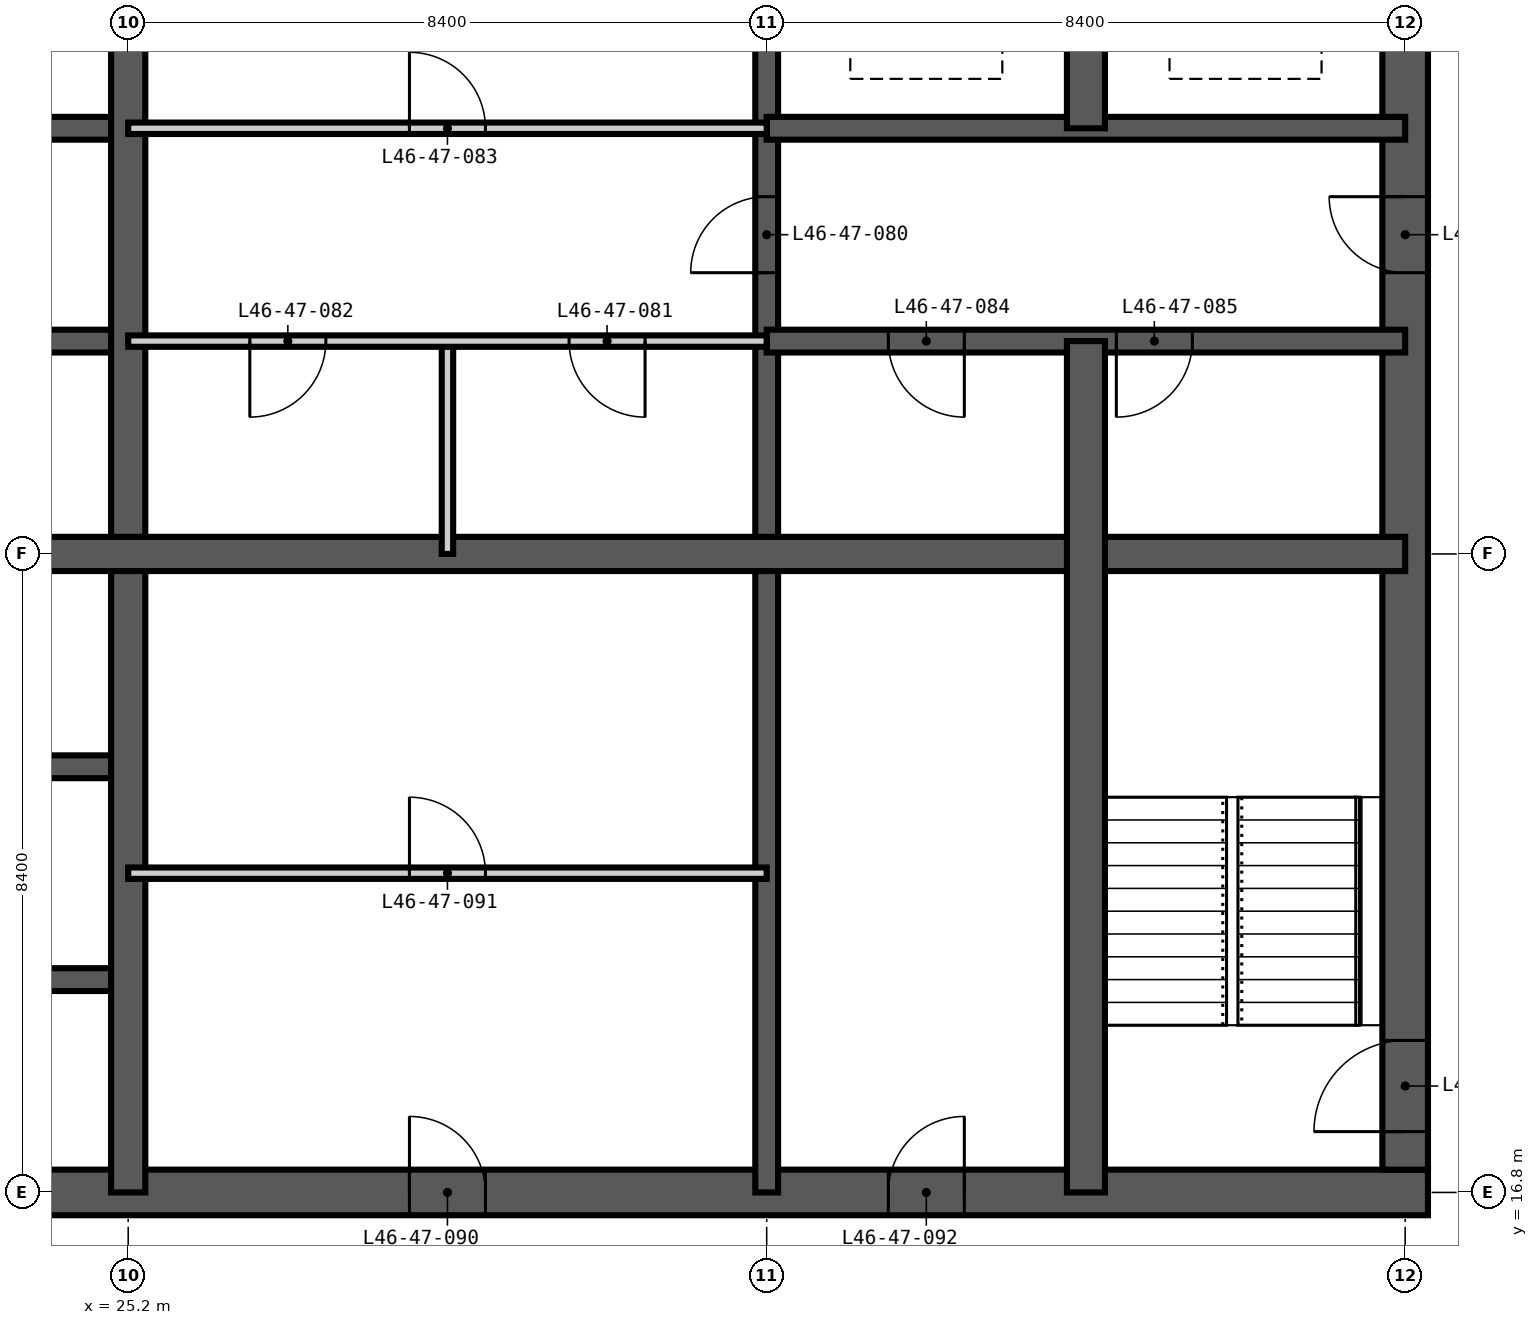
"""IFC4 building model, lengths in metres.
Left out: names, types, materials, properties, quantities, classifications, styles, units other than length and angle.
Written with IfcOpenShell. Run it as: python <this file> out.ifc"""

import sys

from ifc_helpers import new_model, si_unit, direction, frame, frame_2d, origin, place, context, subcontext, project, spatial, rectangle, extrude, element, fill, save


model = new_model("IFC4")
c1 = context("Model", 3, precision=1e-05, world=origin(), true_north=direction((0.0, 1.0)))
c2 = subcontext(c1, "Body", "Model", "MODEL_VIEW")
j1 = project(units=[si_unit("LENGTHUNIT", "METRE"), si_unit("PLANEANGLEUNIT", "RADIAN")], contexts=[c1])
p1 = place(None, origin())
s1 = spatial("IfcSite", under=j1, at=p1, CompositionType="ELEMENT")
p2 = place(p1, origin())
s2 = spatial("IfcBuilding", under=s1, at=p2, CompositionType="ELEMENT")
p3 = place(p2, frame((0.0, 0.0, 180.6)))
s3 = spatial("IfcBuildingStorey", under=s2, at=p3, CompositionType="ELEMENT", Elevation=180.6)
p4 = place(p3, frame((16.5, 16.8, -0.35), z_axis=(0.0, 0.0, 1.0), x_axis=(1.0, 0.0, 0.0)))
e1 = element("IfcWall", 1, at=p4, inside=s3, PredefinedType="SHEAR", context=c2, shape_type="SweptSolid", body=[
    extrude(rectangle(XDim=25.8, YDim=0.6, at=frame_2d((12.9, 0.0))), origin(), (0.0, 0.0, 1.0), 3.6),
])
p5 = place(p4, frame((12.4, 0.0, 0.35)))
e2 = element("IfcOpeningElement", 2, at=p5, cuts=e1, PredefinedType="OPENING", context=c2, shape_type="SweptSolid", body=[
    extrude(rectangle(XDim=1.0, YDim=2.1, at=frame_2d((0.5, 1.05))), frame((0.0, 0.31, 0.0), z_axis=(0.0, -1.0, 0.0), x_axis=(1.0, 0.0, 0.0)), (0.0, 0.0, 1.0), 0.62),
])
p6 = place(p4, frame((18.7, 0.0, 0.35)))
e3 = element("IfcOpeningElement", 3, at=p6, cuts=e1, PredefinedType="OPENING", context=c2, shape_type="SweptSolid", body=[
    extrude(rectangle(XDim=1.0, YDim=2.1, at=frame_2d((0.5, 1.05))), frame((0.0, 0.31, 0.0), z_axis=(0.0, -1.0, 0.0), x_axis=(1.0, 0.0, 0.0)), (0.0, 0.0, 1.0), 0.62),
])
p7 = place(p3, frame((42.0, 17.1, -0.35), z_axis=(0.0, 0.0, 1.0), x_axis=(0.0, 1.0, 0.0)))
e4 = element("IfcWall", 4, at=p7, inside=s3, PredefinedType="SHEAR", context=c2, shape_type="SweptSolid", body=[
    extrude(rectangle(XDim=24.6, YDim=0.6, at=frame_2d((12.3, 0.0))), origin(), (0.0, 0.0, 1.0), 3.6),
])
p8 = place(p7, frame((0.5, 0.0, 0.35)))
e5 = element("IfcOpeningElement", 5, at=p8, cuts=e4, PredefinedType="OPENING", context=c2, shape_type="SweptSolid", body=[
    extrude(rectangle(XDim=1.2, YDim=2.2, at=frame_2d((0.6, 1.1))), frame((0.0, 0.31, 0.0), z_axis=(0.0, -1.0, 0.0), x_axis=(1.0, 0.0, 0.0)), (0.0, 0.0, 1.0), 0.62),
])
p9 = place(p7, frame((11.8, 0.0, 0.35)))
e6 = element("IfcOpeningElement", 6, at=p9, cuts=e4, PredefinedType="OPENING", context=c2, shape_type="SweptSolid", body=[
    extrude(rectangle(XDim=1.0, YDim=2.1, at=frame_2d((0.5, 1.05))), frame((0.0, 0.31, 0.0), z_axis=(0.0, -1.0, 0.0), x_axis=(1.0, 0.0, 0.0)), (0.0, 0.0, 1.0), 0.62),
])
p10 = place(p7, frame((20.2, 0.0, 0.35)))
e7 = element("IfcOpeningElement", 7, at=p10, cuts=e4, PredefinedType="OPENING", context=c2, shape_type="SweptSolid", body=[
    extrude(rectangle(XDim=1.0, YDim=2.1, at=frame_2d((0.5, 1.05))), frame((0.0, 0.31, 0.0), z_axis=(0.0, -1.0, 0.0), x_axis=(1.0, 0.0, 0.0)), (0.0, 0.0, 1.0), 0.62),
])
p11 = place(p3, frame((33.6, 16.8, -0.35), z_axis=(0.0, 0.0, 1.0), x_axis=(0.0, 1.0, 0.0)))
e8 = element("IfcWall", 8, at=p11, inside=s3, PredefinedType="SHEAR", context=c2, shape_type="SweptSolid", body=[
    extrude(rectangle(XDim=25.2, YDim=0.3, at=frame_2d((12.6, 0.0))), origin(), (0.0, 0.0, 1.0), 3.6),
])
p12 = place(p11, frame((22.5, 0.0, 0.35)))
e9 = element("IfcOpeningElement", 9, at=p12, cuts=e8, PredefinedType="OPENING", context=c2, shape_type="SweptSolid", body=[
    extrude(rectangle(XDim=1.2, YDim=2.2, at=frame_2d((0.6, 1.1))), frame((0.0, 0.16, 0.0), z_axis=(0.0, -1.0, 0.0), x_axis=(1.0, 0.0, 0.0)), (0.0, 0.0, 1.0), 0.32),
])
p13 = place(p11, frame((18.3, 0.0, 0.35)))
e10 = element("IfcOpeningElement", 10, at=p13, cuts=e8, PredefinedType="OPENING", context=c2, shape_type="SweptSolid", body=[
    extrude(rectangle(XDim=1.2, YDim=2.2, at=frame_2d((0.6, 1.1))), frame((0.0, 0.16, 0.0), z_axis=(0.0, -1.0, 0.0), x_axis=(1.0, 0.0, 0.0)), (0.0, 0.0, 1.0), 0.32),
])
p14 = place(p11, frame((12.1, 0.0, 0.35)))
e11 = element("IfcOpeningElement", 11, at=p14, cuts=e8, PredefinedType="OPENING", context=c2, shape_type="SweptSolid", body=[
    extrude(rectangle(XDim=1.0, YDim=2.1, at=frame_2d((0.5, 1.05))), frame((0.0, 0.16, 0.0), z_axis=(0.0, -1.0, 0.0), x_axis=(1.0, 0.0, 0.0)), (0.0, 0.0, 1.0), 0.32),
])
p15 = place(p3, frame((16.8, 19.6, -0.35), z_axis=(0.0, 0.0, 1.0), x_axis=(1.0, 0.0, 0.0)))
e12 = element("IfcWall", 12, at=p15, inside=s3, PredefinedType="SHEAR", context=c2, shape_type="SweptSolid", body=[
    extrude(rectangle(XDim=8.4, YDim=0.3, at=frame_2d((4.2, 0.0))), origin(), (0.0, 0.0, 1.0), 3.6),
])
p16 = place(p15, frame((1.6, 0.0, 0.35)))
e13 = element("IfcOpeningElement", 13, at=p16, cuts=e12, PredefinedType="OPENING", context=c2, shape_type="SweptSolid", body=[
    extrude(rectangle(XDim=1.0, YDim=2.1, at=frame_2d((0.5, 1.05))), frame((0.0, 0.16, 0.0), z_axis=(0.0, -1.0, 0.0), x_axis=(1.0, 0.0, 0.0)), (0.0, 0.0, 1.0), 0.32),
])
p17 = place(p15, frame((5.8, 0.0, 0.35)))
e14 = element("IfcOpeningElement", 14, at=p17, cuts=e12, PredefinedType="OPENING", context=c2, shape_type="SweptSolid", body=[
    extrude(rectangle(XDim=1.0, YDim=2.1, at=frame_2d((0.5, 1.05))), frame((0.0, 0.16, 0.0), z_axis=(0.0, -1.0, 0.0), x_axis=(1.0, 0.0, 0.0)), (0.0, 0.0, 1.0), 0.32),
])
p18 = place(p3, frame((16.8, 22.4, -0.35), z_axis=(0.0, 0.0, 1.0), x_axis=(1.0, 0.0, 0.0)))
e15 = element("IfcWall", 15, at=p18, inside=s3, PredefinedType="SHEAR", context=c2, shape_type="SweptSolid", body=[
    extrude(rectangle(XDim=8.4, YDim=0.3, at=frame_2d((4.2, 0.0))), origin(), (0.0, 0.0, 1.0), 3.6),
])
p19 = place(p18, frame((1.6, 0.0, 0.35)))
e16 = element("IfcOpeningElement", 16, at=p19, cuts=e15, PredefinedType="OPENING", context=c2, shape_type="SweptSolid", body=[
    extrude(rectangle(XDim=1.0, YDim=2.1, at=frame_2d((0.5, 1.05))), frame((0.0, 0.16, 0.0), z_axis=(0.0, -1.0, 0.0), x_axis=(1.0, 0.0, 0.0)), (0.0, 0.0, 1.0), 0.32),
])
p20 = place(p18, frame((5.8, 0.0, 0.35)))
e17 = element("IfcOpeningElement", 17, at=p20, cuts=e15, PredefinedType="OPENING", context=c2, shape_type="SweptSolid", body=[
    extrude(rectangle(XDim=1.0, YDim=2.1, at=frame_2d((0.5, 1.05))), frame((0.0, 0.16, 0.0), z_axis=(0.0, -1.0, 0.0), x_axis=(1.0, 0.0, 0.0)), (0.0, 0.0, 1.0), 0.32),
])
p21 = place(p3, frame((16.8, 28.0, -0.35), z_axis=(0.0, 0.0, 1.0), x_axis=(1.0, 0.0, 0.0)))
e18 = element("IfcWall", 18, at=p21, inside=s3, PredefinedType="SHEAR", context=c2, shape_type="SweptSolid", body=[
    extrude(rectangle(XDim=8.4, YDim=0.3, at=frame_2d((4.2, 0.0))), origin(), (0.0, 0.0, 1.0), 3.6),
])
p22 = place(p21, frame((1.55, 0.0, 0.35)))
e19 = element("IfcOpeningElement", 19, at=p22, cuts=e18, PredefinedType="OPENING", context=c2, shape_type="SweptSolid", body=[
    extrude(rectangle(XDim=1.1, YDim=2.2, at=frame_2d((0.55, 1.1))), frame((0.0, 0.16, 0.0), z_axis=(0.0, -1.0, 0.0), x_axis=(1.0, 0.0, 0.0)), (0.0, 0.0, 1.0), 0.32),
])
p23 = place(p21, frame((5.75, 0.0, 0.35)))
e20 = element("IfcOpeningElement", 20, at=p23, cuts=e18, PredefinedType="OPENING", context=c2, shape_type="SweptSolid", body=[
    extrude(rectangle(XDim=1.1, YDim=2.2, at=frame_2d((0.55, 1.1))), frame((0.0, 0.16, 0.0), z_axis=(0.0, -1.0, 0.0), x_axis=(1.0, 0.0, 0.0)), (0.0, 0.0, 1.0), 0.32),
])
p24 = place(p3, frame((33.6, 28.0, -0.35), z_axis=(0.0, 0.0, 1.0), x_axis=(1.0, 0.0, 0.0)))
e21 = element("IfcWall", 21, at=p24, inside=s3, PredefinedType="SHEAR", context=c2, shape_type="SweptSolid", body=[
    extrude(rectangle(XDim=8.4, YDim=0.3, at=frame_2d((4.2, 0.0))), origin(), (0.0, 0.0, 1.0), 3.6),
])
p25 = place(p24, frame((1.6, 0.0, 0.35)))
e22 = element("IfcOpeningElement", 22, at=p25, cuts=e21, PredefinedType="OPENING", context=c2, shape_type="SweptSolid", body=[
    extrude(rectangle(XDim=1.0, YDim=2.1, at=frame_2d((0.5, 1.05))), frame((0.0, 0.16, 0.0), z_axis=(0.0, -1.0, 0.0), x_axis=(1.0, 0.0, 0.0)), (0.0, 0.0, 1.0), 0.32),
])
p26 = place(p24, frame((4.6, 0.0, 0.35)))
e23 = element("IfcOpeningElement", 23, at=p26, cuts=e21, PredefinedType="OPENING", context=c2, shape_type="SweptSolid", body=[
    extrude(rectangle(XDim=1.0, YDim=2.1, at=frame_2d((0.5, 1.05))), frame((0.0, 0.16, 0.0), z_axis=(0.0, -1.0, 0.0), x_axis=(1.0, 0.0, 0.0)), (0.0, 0.0, 1.0), 0.32),
])
p27 = place(p3, frame((16.8, 30.8, -0.35), z_axis=(0.0, 0.0, 1.0), x_axis=(1.0, 0.0, 0.0)))
e24 = element("IfcWall", 24, at=p27, inside=s3, PredefinedType="SHEAR", context=c2, shape_type="SweptSolid", body=[
    extrude(rectangle(XDim=8.4, YDim=0.3, at=frame_2d((4.2, 0.0))), origin(), (0.0, 0.0, 1.0), 3.6),
])
p28 = place(p27, frame((1.55, 0.0, 0.35)))
e25 = element("IfcOpeningElement", 25, at=p28, cuts=e24, PredefinedType="OPENING", context=c2, shape_type="SweptSolid", body=[
    extrude(rectangle(XDim=1.1, YDim=2.2, at=frame_2d((0.55, 1.1))), frame((0.0, 0.16, 0.0), z_axis=(0.0, -1.0, 0.0), x_axis=(1.0, 0.0, 0.0)), (0.0, 0.0, 1.0), 0.32),
])
p29 = place(p27, frame((5.75, 0.0, 0.35)))
e26 = element("IfcOpeningElement", 26, at=p29, cuts=e24, PredefinedType="OPENING", context=c2, shape_type="SweptSolid", body=[
    extrude(rectangle(XDim=1.1, YDim=2.2, at=frame_2d((0.55, 1.1))), frame((0.0, 0.16, 0.0), z_axis=(0.0, -1.0, 0.0), x_axis=(1.0, 0.0, 0.0)), (0.0, 0.0, 1.0), 0.32),
])
p30 = place(p3, frame((33.6, 30.8, -0.35), z_axis=(0.0, 0.0, 1.0), x_axis=(1.0, 0.0, 0.0)))
e27 = element("IfcWall", 27, at=p30, inside=s3, PredefinedType="SHEAR", context=c2, shape_type="SweptSolid", body=[
    extrude(rectangle(XDim=8.4, YDim=0.3, at=frame_2d((4.2, 0.0))), origin(), (0.0, 0.0, 1.0), 3.6),
])
for number, where, z_axis, x_axis in (
    (28, (25.2, 16.8, -0.35), (0.0, 0.0, 1.0), (0.0, 1.0, 0.0)),
    (29, (16.8, 25.2, -0.35), (0.0, 0.0, 1.0), (1.0, 0.0, 0.0)),
):
    element("IfcWall", number, at=place(p3, frame(where, z_axis=z_axis, x_axis=x_axis)), inside=s3, PredefinedType="SHEAR", context=c2, shape_type="SweptSolid", body=[
        extrude(rectangle(XDim=25.2, YDim=0.45, at=frame_2d((12.6, 0.0))), origin(), (0.0, 0.0, 1.0), 3.6),
    ])
p31 = place(p3, frame((37.8, 16.8, -0.35), z_axis=(0.0, 0.0, 1.0), x_axis=(0.0, 1.0, 0.0)))
e30 = element("IfcWall", 30, at=p31, inside=s3, PredefinedType="SHEAR", context=c2, shape_type="SweptSolid", body=[
    extrude(rectangle(XDim=11.2, YDim=0.5, at=frame_2d((5.6, 0.0))), origin(), (0.0, 0.0, 1.0), 3.6),
])
p32 = place(p3, frame((37.8, 30.8, -0.35), z_axis=(0.0, 0.0, 1.0), x_axis=(0.0, 1.0, 0.0)))
e31 = element("IfcWall", 31, at=p32, inside=s3, PredefinedType="SHEAR", context=c2, shape_type="SweptSolid", body=[
    extrude(rectangle(XDim=2.8, YDim=0.5, at=frame_2d((1.4, 0.0))), origin(), (0.0, 0.0, 1.0), 3.6),
])
p33 = place(p3, frame((29.4, 25.2, 0.0), z_axis=(0.0, 0.0, 1.0), x_axis=(0.0, 1.0, 0.0)))
e32 = element("IfcWall", 32, at=p33, inside=s3, PredefinedType="PARTITIONING", context=c2, shape_type="SweptSolid", body=[
    extrude(rectangle(XDim=2.8, YDim=0.15, at=frame_2d((1.4, 0.0))), origin(), (0.0, 0.0, 1.0), 3.25),
])
p34 = place(p3, frame((25.2, 21.0, 0.0), z_axis=(0.0, 0.0, 1.0), x_axis=(1.0, 0.0, 0.0)))
e33 = element("IfcWall", 33, at=p34, inside=s3, PredefinedType="PARTITIONING", context=c2, shape_type="SweptSolid", body=[
    extrude(rectangle(XDim=8.4, YDim=0.15, at=frame_2d((4.2, 0.0))), origin(), (0.0, 0.0, 1.0), 3.25),
])
p35 = place(p34, frame((3.7, 0.0, 0.0)))
e34 = element("IfcOpeningElement", 34, at=p35, cuts=e33, PredefinedType="OPENING", context=c2, shape_type="SweptSolid", body=[
    extrude(rectangle(XDim=1.0, YDim=2.1, at=frame_2d((0.5, 1.05))), frame((0.0, 0.085, 0.0), z_axis=(0.0, -1.0, 0.0), x_axis=(1.0, 0.0, 0.0)), (0.0, 0.0, 1.0), 0.17),
])
p36 = place(p3, frame((25.2, 28.0, 0.0), z_axis=(0.0, 0.0, 1.0), x_axis=(1.0, 0.0, 0.0)))
e35 = element("IfcWall", 35, at=p36, inside=s3, PredefinedType="PARTITIONING", context=c2, shape_type="SweptSolid", body=[
    extrude(rectangle(XDim=8.4, YDim=0.15, at=frame_2d((4.2, 0.0))), origin(), (0.0, 0.0, 1.0), 3.25),
])
p37 = place(p36, frame((5.8, 0.0, 0.0)))
e36 = element("IfcOpeningElement", 36, at=p37, cuts=e35, PredefinedType="OPENING", context=c2, shape_type="SweptSolid", body=[
    extrude(rectangle(XDim=1.0, YDim=2.1, at=frame_2d((0.5, 1.05))), frame((0.0, 0.085, 0.0), z_axis=(0.0, -1.0, 0.0), x_axis=(1.0, 0.0, 0.0)), (0.0, 0.0, 1.0), 0.17),
])
p38 = place(p36, frame((1.6, 0.0, 0.0)))
e37 = element("IfcOpeningElement", 37, at=p38, cuts=e35, PredefinedType="OPENING", context=c2, shape_type="SweptSolid", body=[
    extrude(rectangle(XDim=1.0, YDim=2.1, at=frame_2d((0.5, 1.05))), frame((0.0, 0.085, 0.0), z_axis=(0.0, -1.0, 0.0), x_axis=(1.0, 0.0, 0.0)), (0.0, 0.0, 1.0), 0.17),
])
p39 = place(p3, frame((25.2, 30.8, 0.0), z_axis=(0.0, 0.0, 1.0), x_axis=(1.0, 0.0, 0.0)))
e38 = element("IfcWall", 38, at=p39, inside=s3, PredefinedType="PARTITIONING", context=c2, shape_type="SweptSolid", body=[
    extrude(rectangle(XDim=8.4, YDim=0.15, at=frame_2d((4.2, 0.0))), origin(), (0.0, 0.0, 1.0), 3.25),
])
p40 = place(p39, frame((3.7, 0.0, 0.0)))
e39 = element("IfcOpeningElement", 39, at=p40, cuts=e38, PredefinedType="OPENING", context=c2, shape_type="SweptSolid", body=[
    extrude(rectangle(XDim=1.0, YDim=2.1, at=frame_2d((0.5, 1.05))), frame((0.0, 0.085, 0.0), z_axis=(0.0, -1.0, 0.0), x_axis=(1.0, 0.0, 0.0)), (0.0, 0.0, 1.0), 0.17),
])
p41 = place(p8, origin())
e40 = element("IfcDoor", 40, at=p41, inside=s3, OperationType="SINGLE_SWING_LEFT", PredefinedType="DOOR", context=c2, shape_type="SweptSolid", body=[
    extrude(rectangle(XDim=1.2, YDim=2.2, at=frame_2d((0.6, 1.1))), frame((0.0, 0.025, 0.0), z_axis=(0.0, -1.0, 0.0), x_axis=(1.0, 0.0, 0.0)), (0.0, 0.0, 1.0), 0.05),
])
fill(e5, e40)
p42 = place(p14, origin())
e41 = element("IfcDoor", 41, at=p42, inside=s3, OperationType="SINGLE_SWING_LEFT", PredefinedType="DOOR", context=c2, shape_type="SweptSolid", body=[
    extrude(rectangle(XDim=1.0, YDim=2.1, at=frame_2d((0.5, 1.05))), frame((0.0, 0.025, 0.0), z_axis=(0.0, -1.0, 0.0), x_axis=(1.0, 0.0, 0.0)), (0.0, 0.0, 1.0), 0.05),
])
fill(e11, e41)
p43 = place(p37, frame((1.0, 0.0, 0.0), z_axis=(0.0, 0.0, 1.0), x_axis=(-1.0, 0.0, 0.0)))
e42 = element("IfcDoor", 42, at=p43, inside=s3, OperationType="SINGLE_SWING_LEFT", PredefinedType="DOOR", context=c2, shape_type="SweptSolid", body=[
    extrude(rectangle(XDim=1.0, YDim=2.1, at=frame_2d((0.5, 1.05))), frame((0.0, 0.025, 0.0), z_axis=(0.0, -1.0, 0.0), x_axis=(1.0, 0.0, 0.0)), (0.0, 0.0, 1.0), 0.05),
])
fill(e36, e42)
p44 = place(p38, frame((1.0, 0.0, 0.0), z_axis=(0.0, 0.0, 1.0), x_axis=(-1.0, 0.0, 0.0)))
e43 = element("IfcDoor", 43, at=p44, inside=s3, OperationType="SINGLE_SWING_RIGHT", PredefinedType="DOOR", context=c2, shape_type="SweptSolid", body=[
    extrude(rectangle(XDim=1.0, YDim=2.1, at=frame_2d((0.5, 1.05))), frame((0.0, 0.025, 0.0), z_axis=(0.0, -1.0, 0.0), x_axis=(1.0, 0.0, 0.0)), (0.0, 0.0, 1.0), 0.05),
])
fill(e37, e43)
p45 = place(p40, origin())
e44 = element("IfcDoor", 44, at=p45, inside=s3, OperationType="SINGLE_SWING_LEFT", PredefinedType="DOOR", context=c2, shape_type="SweptSolid", body=[
    extrude(rectangle(XDim=1.0, YDim=2.1, at=frame_2d((0.5, 1.05))), frame((0.0, 0.025, 0.0), z_axis=(0.0, -1.0, 0.0), x_axis=(1.0, 0.0, 0.0)), (0.0, 0.0, 1.0), 0.05),
])
fill(e39, e44)
p46 = place(p25, frame((1.0, 0.0, 0.0), z_axis=(0.0, 0.0, 1.0), x_axis=(-1.0, 0.0, 0.0)))
e45 = element("IfcDoor", 45, at=p46, inside=s3, OperationType="SINGLE_SWING_LEFT", PredefinedType="DOOR", context=c2, shape_type="SweptSolid", body=[
    extrude(rectangle(XDim=1.0, YDim=2.1, at=frame_2d((0.5, 1.05))), frame((0.0, 0.025, 0.0), z_axis=(0.0, -1.0, 0.0), x_axis=(1.0, 0.0, 0.0)), (0.0, 0.0, 1.0), 0.05),
])
fill(e22, e45)
p47 = place(p26, frame((1.0, 0.0, 0.0), z_axis=(0.0, 0.0, 1.0), x_axis=(-1.0, 0.0, 0.0)))
e46 = element("IfcDoor", 46, at=p47, inside=s3, OperationType="SINGLE_SWING_RIGHT", PredefinedType="DOOR", context=c2, shape_type="SweptSolid", body=[
    extrude(rectangle(XDim=1.0, YDim=2.1, at=frame_2d((0.5, 1.05))), frame((0.0, 0.025, 0.0), z_axis=(0.0, -1.0, 0.0), x_axis=(1.0, 0.0, 0.0)), (0.0, 0.0, 1.0), 0.05),
])
fill(e23, e46)
p48 = place(p9, origin())
e47 = element("IfcDoor", 47, at=p48, inside=s3, OperationType="SINGLE_SWING_RIGHT", PredefinedType="DOOR", context=c2, shape_type="SweptSolid", body=[
    extrude(rectangle(XDim=1.0, YDim=2.1, at=frame_2d((0.5, 1.05))), frame((0.0, 0.025, 0.0), z_axis=(0.0, -1.0, 0.0), x_axis=(1.0, 0.0, 0.0)), (0.0, 0.0, 1.0), 0.05),
])
fill(e6, e47)
p49 = place(p5, origin())
e48 = element("IfcDoor", 48, at=p49, inside=s3, OperationType="SINGLE_SWING_LEFT", PredefinedType="DOOR", context=c2, shape_type="SweptSolid", body=[
    extrude(rectangle(XDim=1.0, YDim=2.1, at=frame_2d((0.5, 1.05))), frame((0.0, 0.025, 0.0), z_axis=(0.0, -1.0, 0.0), x_axis=(1.0, 0.0, 0.0)), (0.0, 0.0, 1.0), 0.05),
])
fill(e2, e48)
p50 = place(p35, origin())
e49 = element("IfcDoor", 49, at=p50, inside=s3, OperationType="SINGLE_SWING_LEFT", PredefinedType="DOOR", context=c2, shape_type="SweptSolid", body=[
    extrude(rectangle(XDim=1.0, YDim=2.1, at=frame_2d((0.5, 1.05))), frame((0.0, 0.025, 0.0), z_axis=(0.0, -1.0, 0.0), x_axis=(1.0, 0.0, 0.0)), (0.0, 0.0, 1.0), 0.05),
])
fill(e34, e49)
p51 = place(p6, origin())
e50 = element("IfcDoor", 50, at=p51, inside=s3, OperationType="SINGLE_SWING_RIGHT", PredefinedType="DOOR", context=c2, shape_type="SweptSolid", body=[
    extrude(rectangle(XDim=1.0, YDim=2.1, at=frame_2d((0.5, 1.05))), frame((0.0, 0.025, 0.0), z_axis=(0.0, -1.0, 0.0), x_axis=(1.0, 0.0, 0.0)), (0.0, 0.0, 1.0), 0.05),
])
fill(e3, e50)
save(model, sys.argv[1])
